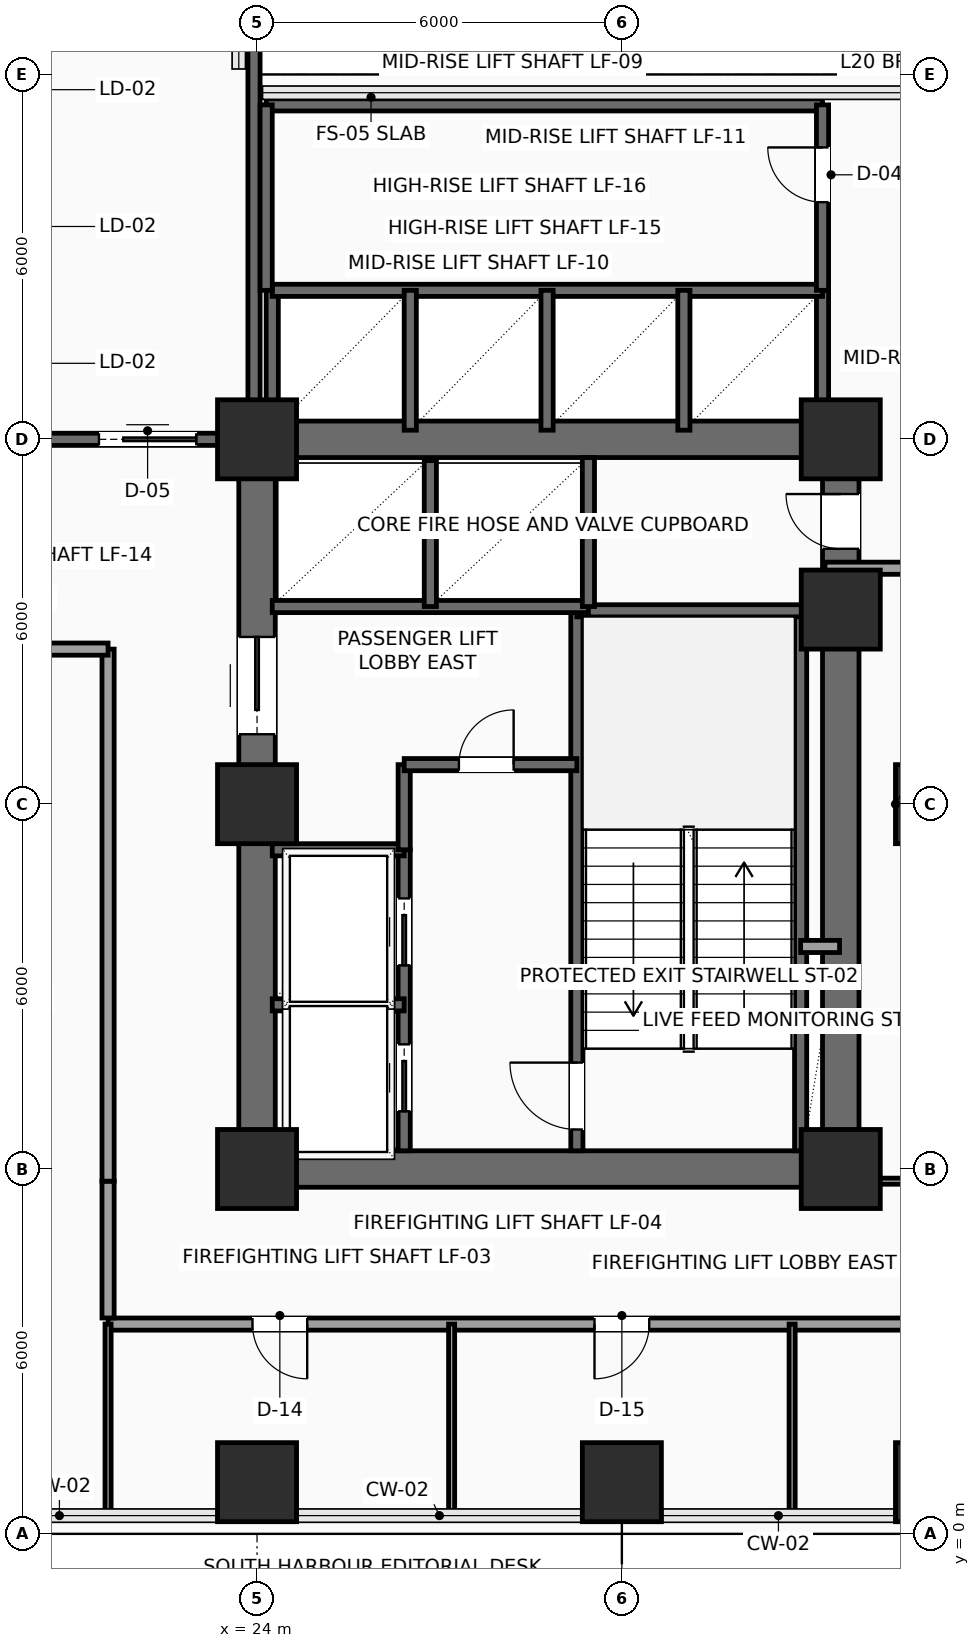
"""IFC4 building model, lengths in metres.
Left out: names, types, materials, properties, quantities, classifications, styles, units other than length and angle.
Written with IfcOpenShell. Run it as: python <this file> out.ifc"""

import sys

from ifc_helpers import new_model, si_unit, direction, frame, frame_2d, origin, origin_2d, place, context, subcontext, project, spatial, rectangle, extrude, element, fill, save


model = new_model("IFC4")
c1 = context("Model", 3, precision=1e-05, world=origin(), true_north=direction((0.0, 1.0)))
c2 = subcontext(c1, "Body", "Model", "MODEL_VIEW")
j1 = project(units=[si_unit("LENGTHUNIT", "METRE"), si_unit("PLANEANGLEUNIT", "RADIAN")], contexts=[c1])
p1 = place(None, origin())
s1 = spatial("IfcSite", under=j1, at=p1, CompositionType="ELEMENT")
p2 = place(p1, origin())
s2 = spatial("IfcBuilding", under=s1, at=p2, CompositionType="ELEMENT")
p3 = place(p2, frame((0.0, 0.0, 87.0)))
s3 = spatial("IfcBuildingStorey", under=s2, at=p3, CompositionType="ELEMENT", Elevation=87.0)
for number, where, z_axis, x_axis in (
    (1, (24.0, 6.0, 0.0), (0.0, 0.0, 1.0), (1.0, 0.0, 0.0)),
    (2, (24.0, 12.0, 0.0), (0.0, 0.0, 1.0), (1.0, 0.0, 0.0)),
    (3, (24.0, 18.0, 0.0), (0.0, 0.0, 1.0), (1.0, 0.0, 0.0)),
    (4, (33.6, 6.0, 0.0), (0.0, 0.0, 1.0), (1.0, 0.0, 0.0)),
    (5, (33.6, 15.2, 0.0), (0.0, 0.0, 1.0), (1.0, 0.0, 0.0)),
    (6, (33.6, 18.0, 0.0), (0.0, 0.0, 1.0), (1.0, 0.0, 0.0)),
    (7, (24.0, 0.85, 0.0), (0.0, 0.0, 1.0), (1.0, 0.0, 0.0)),
    (8, (30.0, 0.85, 0.0), (0.0, 0.0, 1.0), (1.0, 0.0, 0.0)),
    (9, (35.15, 0.85, 0.0), (0.0, 0.0, 1.0), (1.0, 0.0, 0.0)),
    (10, (35.15, 12.0, 0.0), (0.0, 0.0, 1.0), (1.0, 0.0, 0.0)),
):
    element("IfcColumn", number, at=place(p3, frame(where, z_axis=z_axis, x_axis=x_axis)), inside=s3, PredefinedType="COLUMN", context=c2, shape_type="SweptSolid", body=[
        extrude(rectangle(XDim=1.3, YDim=1.3, at=origin_2d()), origin(), (0.0, 0.0, 1.0), 3.9),
    ])
for number, where, z_axis, x_axis in (
    (11, (24.0, 6.0, 0.0), (0.0, 0.0, 1.0), (1.0, 0.0, 0.0)),
    (12, (24.0, 18.0, 0.0), (0.0, 0.0, 1.0), (1.0, 0.0, 0.0)),
):
    element("IfcWall", number, at=place(p3, frame(where, z_axis=z_axis, x_axis=x_axis)), inside=s3, PredefinedType="SHEAR", context=c2, shape_type="SweptSolid", body=[
        extrude(rectangle(XDim=9.6, YDim=0.6, at=frame_2d((4.8, 0.0))), origin(), (0.0, 0.0, 1.0), 3.65),
    ])
p4 = place(p3, frame((24.0, 6.0, 0.0), z_axis=(0.0, 0.0, 1.0), x_axis=(0.0, 1.0, 0.0)))
e13 = element("IfcWall", 13, at=p4, inside=s3, PredefinedType="SHEAR", context=c2, shape_type="SweptSolid", body=[
    extrude(rectangle(XDim=12.0, YDim=0.6, at=frame_2d((6.0, 0.0))), origin(), (0.0, 0.0, 1.0), 3.65),
])
p5 = place(p4, frame((7.15, 0.0, 0.0)))
e14 = element("IfcOpeningElement", 14, at=p5, cuts=e13, PredefinedType="OPENING", context=c2, shape_type="SweptSolid", body=[
    extrude(rectangle(XDim=1.6, YDim=2.3, at=frame_2d((0.8, 1.15))), frame((0.0, 0.31, 0.0), z_axis=(0.0, -1.0, 0.0), x_axis=(1.0, 0.0, 0.0)), (0.0, 0.0, 1.0), 0.62),
])
p6 = place(p3, frame((33.6, 6.0, 0.0), z_axis=(0.0, 0.0, 1.0), x_axis=(0.0, 1.0, 0.0)))
e15 = element("IfcWall", 15, at=p6, inside=s3, PredefinedType="SHEAR", context=c2, shape_type="SweptSolid", body=[
    extrude(rectangle(XDim=12.0, YDim=0.6, at=frame_2d((6.0, 0.0))), origin(), (0.0, 0.0, 1.0), 3.65),
])
p7 = place(p6, frame((10.2, 0.0, 0.0)))
e16 = element("IfcOpeningElement", 16, at=p7, cuts=e15, PredefinedType="OPENING", context=c2, shape_type="SweptSolid", body=[
    extrude(rectangle(XDim=0.9, YDim=2.15, at=frame_2d((0.45, 1.075))), frame((0.0, 0.31, 0.0), z_axis=(0.0, -1.0, 0.0), x_axis=(1.0, 0.0, 0.0)), (0.0, 0.0, 1.0), 0.62),
])
p8 = place(p3, frame((29.26, 6.3, 0.0), z_axis=(0.0, 0.0, 1.0), x_axis=(0.0, 1.0, 0.0)))
e17 = element("IfcWall", 17, at=p8, inside=s3, PredefinedType="SHEAR", context=c2, shape_type="SweptSolid", body=[
    extrude(rectangle(XDim=8.88, YDim=0.2, at=frame_2d((4.44, 0.0))), origin(), (0.0, 0.0, 1.0), 3.65),
])
p9 = place(p8, frame((0.35, 0.0, 0.0)))
e18 = element("IfcOpeningElement", 18, at=p9, cuts=e17, PredefinedType="OPENING", context=c2, shape_type="SweptSolid", body=[
    extrude(rectangle(XDim=1.1, YDim=2.2, at=frame_2d((0.55, 1.1))), frame((0.0, 0.11, 0.0), z_axis=(0.0, -1.0, 0.0), x_axis=(1.0, 0.0, 0.0)), (0.0, 0.0, 1.0), 0.22),
])
p10 = place(p3, frame((32.94, 6.3, 0.0), z_axis=(0.0, 0.0, 1.0), x_axis=(0.0, 1.0, 0.0)))
e19 = element("IfcWall", 19, at=p10, inside=s3, PredefinedType="SHEAR", context=c2, shape_type="SweptSolid", body=[
    extrude(rectangle(XDim=8.88, YDim=0.2, at=frame_2d((4.44, 0.0))), origin(), (0.0, 0.0, 1.0), 3.65),
])
p11 = place(p3, frame((29.26, 15.18, 0.0), z_axis=(0.0, 0.0, 1.0), x_axis=(1.0, 0.0, 0.0)))
e20 = element("IfcWall", 20, at=p11, inside=s3, PredefinedType="SHEAR", context=c2, shape_type="SweptSolid", body=[
    extrude(rectangle(XDim=4.04, YDim=0.2, at=frame_2d((2.02, 0.0))), origin(), (0.0, 0.0, 1.0), 3.65),
])
p12 = place(p3, frame((26.42, 6.3, 0.0), z_axis=(0.0, 0.0, 1.0), x_axis=(0.0, 1.0, 0.0)))
e21 = element("IfcWall", 21, at=p12, inside=s3, PredefinedType="SHEAR", context=c2, shape_type="SweptSolid", body=[
    extrude(rectangle(XDim=4.95, YDim=0.2, at=frame_2d((2.475, 0.0))), origin(), (0.0, 0.0, 1.0), 3.65),
])
p13 = place(p12, frame((0.65, 0.0, 0.0)))
e22 = element("IfcOpeningElement", 22, at=p13, cuts=e21, PredefinedType="OPENING", context=c2, shape_type="SweptSolid", body=[
    extrude(rectangle(XDim=1.1, YDim=2.2, at=frame_2d((0.55, 1.1))), frame((0.0, 0.11, 0.0), z_axis=(0.0, -1.0, 0.0), x_axis=(1.0, 0.0, 0.0)), (0.0, 0.0, 1.0), 0.22),
])
p14 = place(p12, frame((3.05, 0.0, 0.0)))
e23 = element("IfcOpeningElement", 23, at=p14, cuts=e21, PredefinedType="OPENING", context=c2, shape_type="SweptSolid", body=[
    extrude(rectangle(XDim=1.1, YDim=2.2, at=frame_2d((0.55, 1.1))), frame((0.0, 0.11, 0.0), z_axis=(0.0, -1.0, 0.0), x_axis=(1.0, 0.0, 0.0)), (0.0, 0.0, 1.0), 0.22),
])
for number, where, z_axis, x_axis in (
    (24, (24.25, 8.7, 0.0), (0.0, 0.0, 1.0), (1.0, 0.0, 0.0)),
    (25, (24.25, 11.25, 0.0), (0.0, 0.0, 1.0), (1.0, 0.0, 0.0)),
):
    element("IfcWall", number, at=place(p3, frame(where, z_axis=z_axis, x_axis=x_axis)), inside=s3, PredefinedType="SHEAR", context=c2, shape_type="SweptSolid", body=[
        extrude(rectangle(XDim=2.17, YDim=0.2, at=frame_2d((1.085, 0.0))), origin(), (0.0, 0.0, 1.0), 3.65),
    ])
p15 = place(p3, frame((26.42, 11.25, 0.0), z_axis=(0.0, 0.0, 1.0), x_axis=(0.0, 1.0, 0.0)))
e26 = element("IfcWall", 26, at=p15, inside=s3, PredefinedType="SHEAR", context=c2, shape_type="SweptSolid", body=[
    extrude(rectangle(XDim=1.4, YDim=0.2, at=frame_2d((0.7, 0.0))), origin(), (0.0, 0.0, 1.0), 3.65),
])
p16 = place(p3, frame((26.42, 12.65, 0.0), z_axis=(0.0, 0.0, 1.0), x_axis=(1.0, 0.0, 0.0)))
e27 = element("IfcWall", 27, at=p16, inside=s3, PredefinedType="SHEAR", context=c2, shape_type="SweptSolid", body=[
    extrude(rectangle(XDim=2.84, YDim=0.2, at=frame_2d((1.42, 0.0))), origin(), (0.0, 0.0, 1.0), 3.65),
])
p17 = place(p16, frame((0.9, 0.0, 0.0)))
e28 = element("IfcOpeningElement", 28, at=p17, cuts=e27, PredefinedType="OPENING", context=c2, shape_type="SweptSolid", body=[
    extrude(rectangle(XDim=0.9, YDim=2.15, at=frame_2d((0.45, 1.075))), frame((0.0, 0.11, 0.0), z_axis=(0.0, -1.0, 0.0), x_axis=(1.0, 0.0, 0.0)), (0.0, 0.0, 1.0), 0.22),
])
p18 = place(p3, frame((32.94, 9.66, 0.0), z_axis=(0.0, 0.0, 1.0), x_axis=(1.0, 0.0, 0.0)))
e29 = element("IfcWall", 29, at=p18, inside=s3, PredefinedType="SOLIDWALL", context=c2, shape_type="SweptSolid", body=[
    extrude(rectangle(XDim=0.64, YDim=0.2, at=frame_2d((0.32, 0.0))), origin(), (0.0, 0.0, 1.0), 3.65),
])
p19 = place(p3, frame((24.25, 15.25, 0.0), z_axis=(0.0, 0.0, 1.0), x_axis=(1.0, 0.0, 0.0)))
e30 = element("IfcWall", 30, at=p19, inside=s3, PredefinedType="SHEAR", context=c2, shape_type="SweptSolid", body=[
    extrude(rectangle(XDim=5.2, YDim=0.2, at=frame_2d((2.6, 0.0))), origin(), (0.0, 0.0, 1.0), 3.65),
])
p20 = place(p3, frame((26.85, 15.25, 0.0), z_axis=(0.0, 0.0, 1.0), x_axis=(0.0, 1.0, 0.0)))
e31 = element("IfcWall", 31, at=p20, inside=s3, PredefinedType="SHEAR", context=c2, shape_type="SweptSolid", body=[
    extrude(rectangle(XDim=2.4, YDim=0.2, at=frame_2d((1.2, 0.0))), origin(), (0.0, 0.0, 1.0), 3.65),
])
p21 = place(p3, frame((29.45, 15.25, 0.0), z_axis=(0.0, 0.0, 1.0), x_axis=(0.0, 1.0, 0.0)))
e32 = element("IfcWall", 32, at=p21, inside=s3, PredefinedType="SHEAR", context=c2, shape_type="SweptSolid", body=[
    extrude(rectangle(XDim=2.45, YDim=0.2, at=frame_2d((1.225, 0.0))), origin(), (0.0, 0.0, 1.0), 3.65),
])
p22 = place(p3, frame((20.45, 18.0, 0.0), z_axis=(0.0, 0.0, 1.0), x_axis=(1.0, 0.0, 0.0)))
e33 = element("IfcWall", 33, at=p22, inside=s3, PredefinedType="SHEAR", context=c2, shape_type="SweptSolid", body=[
    extrude(rectangle(XDim=3.5, YDim=0.2, at=frame_2d((1.75, 0.0))), origin(), (0.0, 0.0, 1.0), 3.65),
])
p23 = place(p22, frame((0.95, 0.0, 0.0)))
e34 = element("IfcOpeningElement", 34, at=p23, cuts=e33, PredefinedType="OPENING", context=c2, shape_type="SweptSolid", body=[
    extrude(rectangle(XDim=1.6, YDim=2.3, at=frame_2d((0.8, 1.15))), frame((0.0, 0.11, 0.0), z_axis=(0.0, -1.0, 0.0), x_axis=(1.0, 0.0, 0.0)), (0.0, 0.0, 1.0), 0.22),
])
p24 = place(p3, frame((23.95, 18.0, 0.0), z_axis=(0.0, 0.0, 1.0), x_axis=(0.0, 1.0, 0.0)))
e35 = element("IfcWall", 35, at=p24, inside=s3, PredefinedType="SHEAR", context=c2, shape_type="SweptSolid", body=[
    extrude(rectangle(XDim=9.3, YDim=0.2, at=frame_2d((4.65, 0.0))), origin(), (0.0, 0.0, 1.0), 3.65),
])
for number, where, z_axis, x_axis in (
    (36, (33.3, 18.1, 0.0), (0.0, 0.0, 1.0), (0.0, 1.0, 0.0)),
    (37, (24.25, 18.1, 0.0), (0.0, 0.0, 1.0), (0.0, 1.0, 0.0)),
):
    element("IfcWall", number, at=place(p3, frame(where, z_axis=z_axis, x_axis=x_axis)), inside=s3, PredefinedType="SHEAR", context=c2, shape_type="SweptSolid", body=[
        extrude(rectangle(XDim=2.35, YDim=0.2, at=frame_2d((1.175, 0.0))), origin(), (0.0, 0.0, 1.0), 3.65),
    ])
p25 = place(p3, frame((24.25, 20.45, 0.0), z_axis=(0.0, 0.0, 1.0), x_axis=(1.0, 0.0, 0.0)))
e38 = element("IfcWall", 38, at=p25, inside=s3, PredefinedType="SHEAR", context=c2, shape_type="SweptSolid", body=[
    extrude(rectangle(XDim=9.05, YDim=0.2, at=frame_2d((4.525, 0.0))), origin(), (0.0, 0.0, 1.0), 3.65),
])
for number, where, z_axis, x_axis in (
    (39, (26.52, 18.15, 0.0), (0.0, 0.0, 1.0), (0.0, 1.0, 0.0)),
    (40, (28.77, 18.15, 0.0), (0.0, 0.0, 1.0), (0.0, 1.0, 0.0)),
    (41, (31.02, 18.15, 0.0), (0.0, 0.0, 1.0), (0.0, 1.0, 0.0)),
):
    element("IfcWall", number, at=place(p3, frame(where, z_axis=z_axis, x_axis=x_axis)), inside=s3, PredefinedType="SHEAR", context=c2, shape_type="SweptSolid", body=[
        extrude(rectangle(XDim=2.3, YDim=0.2, at=frame_2d((1.15, 0.0))), origin(), (0.0, 0.0, 1.0), 3.65),
    ])
p26 = place(p3, frame((24.15, 23.5, 0.0), z_axis=(0.0, 0.0, 1.0), x_axis=(1.0, 0.0, 0.0)))
e42 = element("IfcWall", 42, at=p26, inside=s3, PredefinedType="SHEAR", context=c2, shape_type="SweptSolid", body=[
    extrude(rectangle(XDim=9.15, YDim=0.2, at=frame_2d((4.575, 0.0))), origin(), (0.0, 0.0, 1.0), 3.65),
])
p27 = place(p3, frame((33.3, 20.45, 0.0), z_axis=(0.0, 0.0, 1.0), x_axis=(0.0, 1.0, 0.0)))
e43 = element("IfcWall", 43, at=p27, inside=s3, PredefinedType="SHEAR", context=c2, shape_type="SweptSolid", body=[
    extrude(rectangle(XDim=3.05, YDim=0.2, at=frame_2d((1.525, 0.0))), origin(), (0.0, 0.0, 1.0), 3.65),
])
p28 = place(p27, frame((1.45, 0.0, 0.0)))
e44 = element("IfcOpeningElement", 44, at=p28, cuts=e43, PredefinedType="OPENING", context=c2, shape_type="SweptSolid", body=[
    extrude(rectangle(XDim=0.9, YDim=2.15, at=frame_2d((0.45, 1.075))), frame((0.0, 0.11, 0.0), z_axis=(0.0, -1.0, 0.0), x_axis=(1.0, 0.0, 0.0)), (0.0, 0.0, 1.0), 0.22),
])
p29 = place(p3, frame((24.15, 20.45, 0.0), z_axis=(0.0, 0.0, 1.0), x_axis=(0.0, 1.0, 0.0)))
e45 = element("IfcWall", 45, at=p29, inside=s3, PredefinedType="SHEAR", context=c2, shape_type="SweptSolid", body=[
    extrude(rectangle(XDim=3.05, YDim=0.2, at=frame_2d((1.525, 0.0))), origin(), (0.0, 0.0, 1.0), 3.65),
])
p30 = place(p3, frame((36.15, 15.88, 0.0), z_axis=(0.0, 0.0, 1.0), x_axis=(-1.0, 0.0, 0.0)))
e46 = element("IfcWall", 46, at=p30, inside=s3, PredefinedType="SOLIDWALL", context=c2, shape_type="SweptSolid", body=[
    extrude(rectangle(XDim=2.81, YDim=0.2, at=frame_2d((1.405, 0.0))), origin(), (0.0, 0.0, 1.0), 3.65),
])
p31 = place(p3, frame((36.15, 3.45, 0.0), z_axis=(0.0, 0.0, 1.0), x_axis=(-1.0, 0.0, 0.0)))
e47 = element("IfcWall", 47, at=p31, inside=s3, PredefinedType="SOLIDWALL", context=c2, shape_type="SweptSolid", body=[
    extrude(rectangle(XDim=14.6, YDim=0.2, at=frame_2d((7.3, 0.0))), origin(), (0.0, 0.0, 1.0), 3.142),
])
p32 = place(p31, frame((11.325, 0.0, 0.0)))
e48 = element("IfcOpeningElement", 48, at=p32, cuts=e47, PredefinedType="OPENING", context=c2, shape_type="SweptSolid", body=[
    extrude(rectangle(XDim=0.9, YDim=2.1, at=frame_2d((0.45, 1.05))), frame((0.0, 0.11, 0.0), z_axis=(0.0, -1.0, 0.0), x_axis=(1.0, 0.0, 0.0)), (0.0, 0.0, 1.0), 0.22),
])
p33 = place(p31, frame((5.7, 0.0, 0.0)))
e49 = element("IfcOpeningElement", 49, at=p33, cuts=e47, PredefinedType="OPENING", context=c2, shape_type="SweptSolid", body=[
    extrude(rectangle(XDim=0.9, YDim=2.1, at=frame_2d((0.45, 1.05))), frame((0.0, 0.11, 0.0), z_axis=(0.0, -1.0, 0.0), x_axis=(1.0, 0.0, 0.0)), (0.0, 0.0, 1.0), 0.22),
])
p34 = place(p3, frame((21.55, 3.55, 0.0), z_axis=(0.0, 0.0, 1.0), x_axis=(0.0, 1.0, 0.0)))
e50 = element("IfcWall", 50, at=p34, inside=s3, PredefinedType="SOLIDWALL", context=c2, shape_type="SweptSolid", body=[
    extrude(rectangle(XDim=2.25, YDim=0.2, at=frame_2d((1.125, 0.0))), origin(), (0.0, 0.0, 1.0), 3.65),
])
p35 = place(p3, frame((21.55, 5.8, 0.0), z_axis=(0.0, 0.0, 1.0), x_axis=(0.0, 1.0, 0.0)))
e51 = element("IfcWall", 51, at=p35, inside=s3, PredefinedType="SOLIDWALL", context=c2, shape_type="SweptSolid", body=[
    extrude(rectangle(XDim=8.75, YDim=0.2, at=frame_2d((4.375, 0.0))), origin(), (0.0, 0.0, 1.0), 3.65),
])
p36 = place(p3, frame((21.55, 14.55, 0.0), z_axis=(0.0, 0.0, 1.0), x_axis=(-1.0, 0.0, 0.0)))
e52 = element("IfcWall", 52, at=p36, inside=s3, PredefinedType="SOLIDWALL", context=c2, shape_type="SweptSolid", body=[
    extrude(rectangle(XDim=8.95, YDim=0.2, at=frame_2d((4.475, 0.0))), origin(), (0.0, 0.0, 1.0), 3.65),
])
p37 = place(p36, frame((6.0, 0.0, 0.0)))
e53 = element("IfcOpeningElement", 53, at=p37, cuts=e52, PredefinedType="OPENING", context=c2, shape_type="SweptSolid", body=[
    extrude(rectangle(XDim=0.9, YDim=2.1, at=frame_2d((0.45, 1.05))), frame((0.0, 0.11, 0.0), z_axis=(0.0, -1.0, 0.0), x_axis=(1.0, 0.0, 0.0)), (0.0, 0.0, 1.0), 0.22),
])
p38 = place(p36, frame((1.525, 0.0, 0.0)))
e54 = element("IfcOpeningElement", 54, at=p38, cuts=e52, PredefinedType="OPENING", context=c2, shape_type="SweptSolid", body=[
    extrude(rectangle(XDim=0.9, YDim=2.1, at=frame_2d((0.45, 1.05))), frame((0.0, 0.11, 0.0), z_axis=(0.0, -1.0, 0.0), x_axis=(1.0, 0.0, 0.0)), (0.0, 0.0, 1.0), 0.22),
])
for number, where, z_axis, x_axis in (
    (55, (21.55, 0.3, 0.0), (0.0, 0.0, 1.0), (0.0, 1.0, 0.0)),
    (56, (27.2, 0.3, 0.0), (0.0, 0.0, 1.0), (0.0, 1.0, 0.0)),
    (57, (32.8, 0.3, 0.0), (0.0, 0.0, 1.0), (0.0, 1.0, 0.0)),
):
    element("IfcWall", number, at=place(p3, frame(where, z_axis=z_axis, x_axis=x_axis)), inside=s3, PredefinedType="PARTITIONING", context=c2, shape_type="SweptSolid", body=[
        extrude(rectangle(XDim=3.15, YDim=0.1, at=frame_2d((1.575, 0.0))), origin(), (0.0, 0.0, 1.0), 3.65),
    ])
p39 = place(p3, frame((33.65, 5.8, 0.0), z_axis=(0.0, 0.0, 1.0), x_axis=(1.0, 0.0, 0.0)))
e58 = element("IfcWall", 58, at=p39, inside=s3, PredefinedType="PARTITIONING", context=c2, shape_type="SweptSolid", body=[
    extrude(rectangle(XDim=2.5, YDim=0.1, at=frame_2d((1.25, 0.0))), origin(), (0.0, 0.0, 1.0), 2.992),
])
p40 = place(p5, origin())
e59 = element("IfcDoor", 59, at=p40, inside=s3, OperationType="DOUBLE_DOOR_SLIDING", PredefinedType="DOOR", context=c2, shape_type="SweptSolid", body=[
    extrude(rectangle(XDim=1.6, YDim=2.3, at=frame_2d((0.8, 1.15))), frame((0.0, 0.025, 0.0), z_axis=(0.0, -1.0, 0.0), x_axis=(1.0, 0.0, 0.0)), (0.0, 0.0, 1.0), 0.05),
])
fill(e14, e59)
p41 = place(p7, origin())
e60 = element("IfcDoor", 60, at=p41, inside=s3, OperationType="SINGLE_SWING_RIGHT", PredefinedType="DOOR", context=c2, shape_type="SweptSolid", body=[
    extrude(rectangle(XDim=0.9, YDim=2.15, at=frame_2d((0.45, 1.075))), frame((0.0, 0.025, 0.0), z_axis=(0.0, -1.0, 0.0), x_axis=(1.0, 0.0, 0.0)), (0.0, 0.0, 1.0), 0.05),
])
fill(e16, e60)
p42 = place(p9, origin())
e61 = element("IfcDoor", 61, at=p42, inside=s3, OperationType="SINGLE_SWING_RIGHT", PredefinedType="DOOR", context=c2, shape_type="SweptSolid", body=[
    extrude(rectangle(XDim=1.1, YDim=2.2, at=frame_2d((0.55, 1.1))), frame((0.0, 0.025, 0.0), z_axis=(0.0, -1.0, 0.0), x_axis=(1.0, 0.0, 0.0)), (0.0, 0.0, 1.0), 0.05),
])
fill(e18, e61)
p43 = place(p13, origin())
e62 = element("IfcDoor", 62, at=p43, inside=s3, OperationType="SLIDING_TO_LEFT", PredefinedType="DOOR", context=c2, shape_type="SweptSolid", body=[
    extrude(rectangle(XDim=1.1, YDim=2.2, at=frame_2d((0.55, 1.1))), frame((0.0, 0.025, 0.0), z_axis=(0.0, -1.0, 0.0), x_axis=(1.0, 0.0, 0.0)), (0.0, 0.0, 1.0), 0.05),
])
fill(e22, e62)
p44 = place(p14, origin())
e63 = element("IfcDoor", 63, at=p44, inside=s3, OperationType="SLIDING_TO_LEFT", PredefinedType="DOOR", context=c2, shape_type="SweptSolid", body=[
    extrude(rectangle(XDim=1.1, YDim=2.2, at=frame_2d((0.55, 1.1))), frame((0.0, 0.025, 0.0), z_axis=(0.0, -1.0, 0.0), x_axis=(1.0, 0.0, 0.0)), (0.0, 0.0, 1.0), 0.05),
])
fill(e23, e63)
p45 = place(p17, origin())
e64 = element("IfcDoor", 64, at=p45, inside=s3, OperationType="SINGLE_SWING_RIGHT", PredefinedType="DOOR", context=c2, shape_type="SweptSolid", body=[
    extrude(rectangle(XDim=0.9, YDim=2.15, at=frame_2d((0.45, 1.075))), frame((0.0, 0.025, 0.0), z_axis=(0.0, -1.0, 0.0), x_axis=(1.0, 0.0, 0.0)), (0.0, 0.0, 1.0), 0.05),
])
fill(e28, e64)
p46 = place(p23, origin())
e65 = element("IfcDoor", 65, at=p46, inside=s3, OperationType="DOUBLE_DOOR_SLIDING", PredefinedType="DOOR", context=c2, shape_type="SweptSolid", body=[
    extrude(rectangle(XDim=1.6, YDim=2.3, at=frame_2d((0.8, 1.15))), frame((0.0, 0.025, 0.0), z_axis=(0.0, -1.0, 0.0), x_axis=(1.0, 0.0, 0.0)), (0.0, 0.0, 1.0), 0.05),
])
fill(e34, e65)
p47 = place(p28, origin())
e66 = element("IfcDoor", 66, at=p47, inside=s3, OperationType="SINGLE_SWING_RIGHT", PredefinedType="DOOR", context=c2, shape_type="SweptSolid", body=[
    extrude(rectangle(XDim=0.9, YDim=2.15, at=frame_2d((0.45, 1.075))), frame((0.0, 0.025, 0.0), z_axis=(0.0, -1.0, 0.0), x_axis=(1.0, 0.0, 0.0)), (0.0, 0.0, 1.0), 0.05),
])
fill(e44, e66)
p48 = place(p32, origin())
e67 = element("IfcDoor", 67, at=p48, inside=s3, OperationType="SINGLE_SWING_LEFT", PredefinedType="DOOR", context=c2, shape_type="SweptSolid", body=[
    extrude(rectangle(XDim=0.9, YDim=2.1, at=frame_2d((0.45, 1.05))), frame((0.0, 0.025, 0.0), z_axis=(0.0, -1.0, 0.0), x_axis=(1.0, 0.0, 0.0)), (0.0, 0.0, 1.0), 0.05),
])
fill(e48, e67)
p49 = place(p33, origin())
e68 = element("IfcDoor", 68, at=p49, inside=s3, OperationType="SINGLE_SWING_RIGHT", PredefinedType="DOOR", context=c2, shape_type="SweptSolid", body=[
    extrude(rectangle(XDim=0.9, YDim=2.1, at=frame_2d((0.45, 1.05))), frame((0.0, 0.025, 0.0), z_axis=(0.0, -1.0, 0.0), x_axis=(1.0, 0.0, 0.0)), (0.0, 0.0, 1.0), 0.05),
])
fill(e49, e68)
save(model, sys.argv[1])
